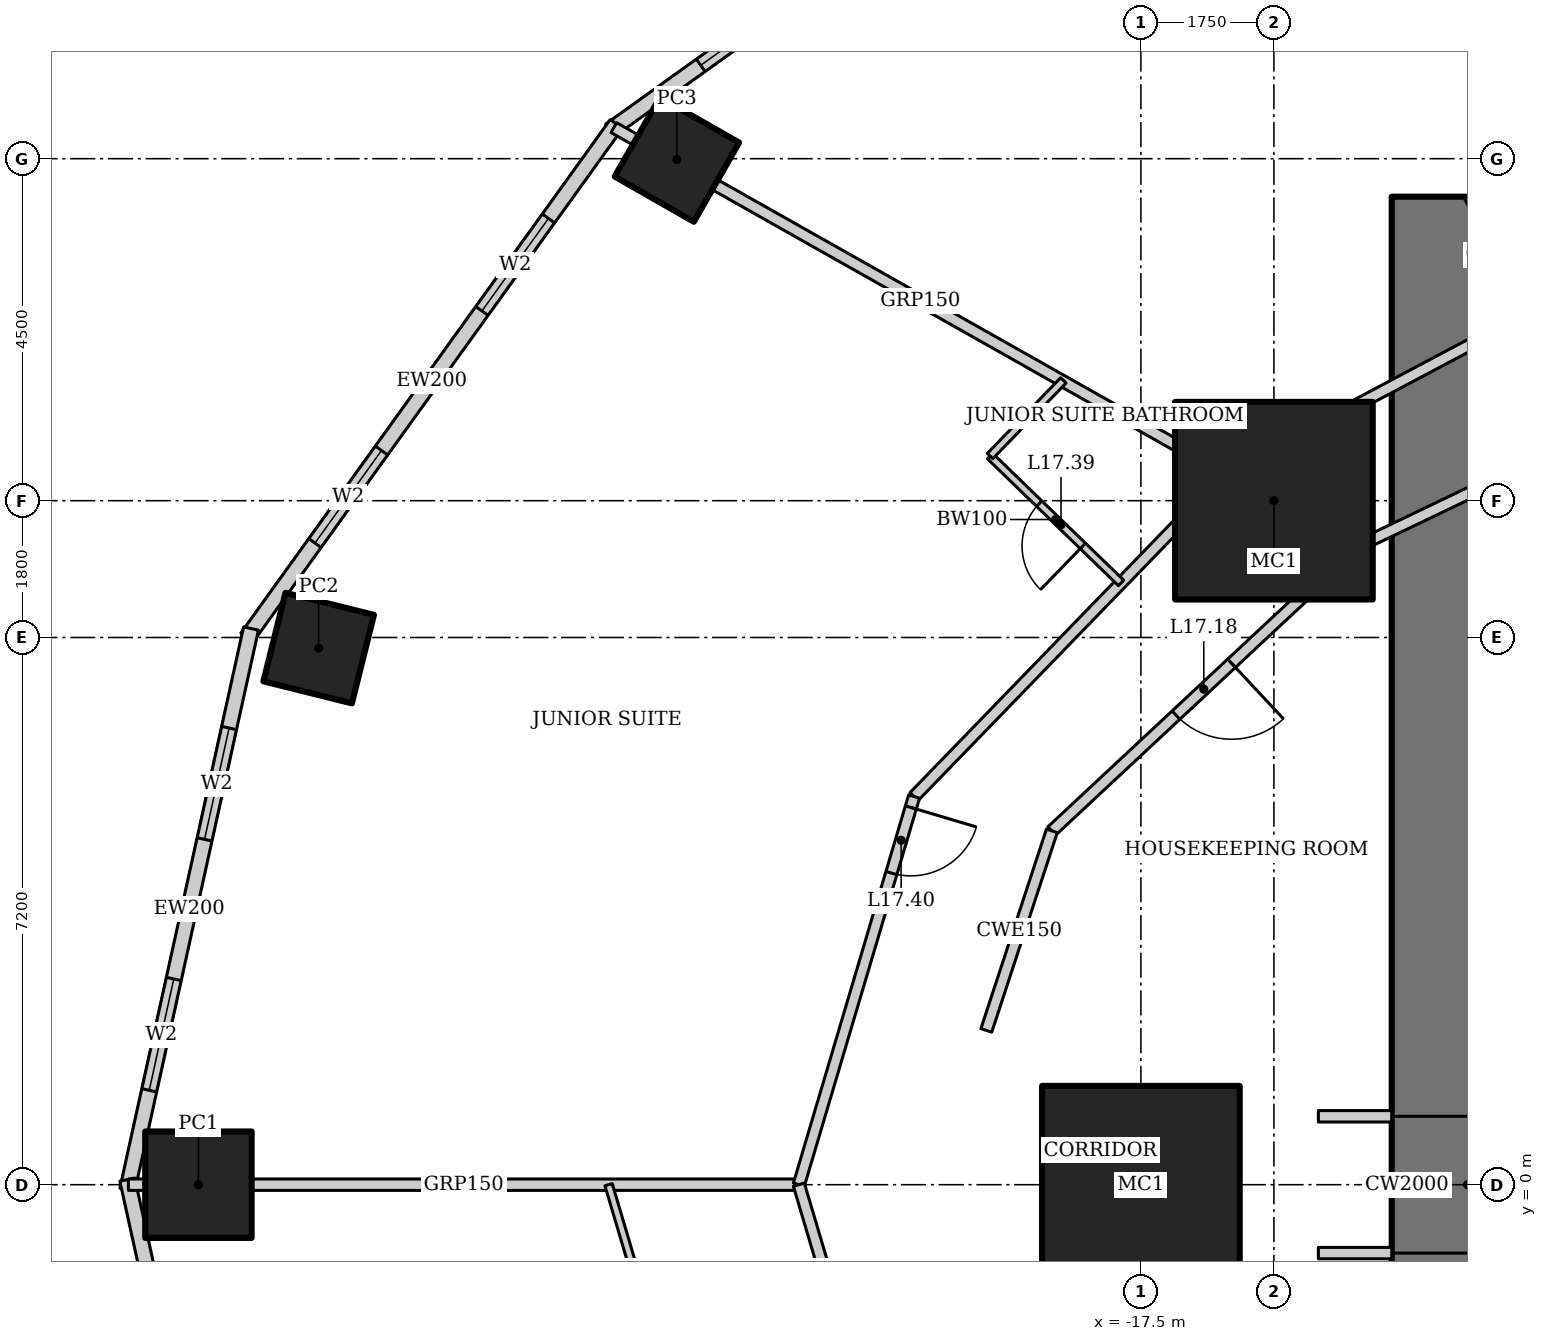
"""IFC4 building model, lengths in metres.
Left out: names, types, materials, properties, quantities, classifications, styles, units other than length and angle.
Written with IfcOpenShell. Run it as: python <this file> out.ifc"""

import sys

from ifc_helpers import new_model, si_unit, direction, frame, frame_2d, origin, origin_2d, place, context, subcontext, project, spatial, rectangle, hollow_rectangle, extrude, element, fill, save


model = new_model("IFC4")
c1 = context("Model", 3, precision=1e-05, world=origin(), true_north=direction((0.0, 1.0)))
c2 = subcontext(c1, "Body", "Model", "MODEL_VIEW")
j1 = project(units=[si_unit("LENGTHUNIT", "METRE"), si_unit("PLANEANGLEUNIT", "RADIAN")], contexts=[c1])
p1 = place(None, origin())
s1 = spatial("IfcSite", under=j1, at=p1, CompositionType="ELEMENT")
p2 = place(p1, origin())
s2 = spatial("IfcBuilding", under=s1, at=p2, CompositionType="ELEMENT")
p3 = place(p2, frame((0.0, 0.0, 76.6)))
s3 = spatial("IfcBuildingStorey", under=s2, at=p3, CompositionType="ELEMENT", Elevation=76.6)
for number, where, z_axis, x_axis in (
    (1, (-15.75, 9.0, 0.0), (0.0, 0.0, 1.0), (1.0, 0.0, 0.0)),
    (2, (-17.5, 0.0, 0.0), (0.0, 0.0, 1.0), (1.0, 0.0, 0.0)),
):
    element("IfcColumn", number, at=place(p3, frame(where, z_axis=z_axis, x_axis=x_axis)), inside=s3, PredefinedType="COLUMN", context=c2, shape_type="SweptSolid", body=[
        extrude(hollow_rectangle(XDim=2.6, YDim=2.6, WallThickness=0.13, at=origin_2d()), origin(), (0.0, 0.0, 1.0), 3.6),
    ])
p4 = place(p3, frame((-23.605, 13.489, 0.0), z_axis=(0.0, 0.0, 1.0), x_axis=(0.496139221777, 0.86824298017, 0.0)))
e3 = element("IfcColumn", 3, at=p4, inside=s3, PredefinedType="COLUMN", context=c2, shape_type="SweptSolid", body=[
    extrude(hollow_rectangle(XDim=1.2, YDim=1.2, WallThickness=0.12, at=origin_2d()), origin(), (0.0, 0.0, 1.0), 3.6),
])
p5 = place(p3, frame((-28.318, 7.06, 0.0), z_axis=(0.0, 0.0, 1.0), x_axis=(0.2419218956, 0.970295726276, 0.0)))
e4 = element("IfcColumn", 4, at=p5, inside=s3, PredefinedType="COLUMN", context=c2, shape_type="SweptSolid", body=[
    extrude(hollow_rectangle(XDim=1.2, YDim=1.2, WallThickness=0.1, at=origin_2d()), origin(), (0.0, 0.0, 1.0), 3.6),
])
p6 = place(p3, frame((-29.9, 0.0, 0.0), z_axis=(0.0, 0.0, 1.0), x_axis=(1.0, 0.0, 0.0)))
e5 = element("IfcColumn", 5, at=p6, inside=s3, PredefinedType="COLUMN", context=c2, shape_type="SweptSolid", body=[
    extrude(hollow_rectangle(XDim=1.4, YDim=1.4, WallThickness=0.1, at=origin_2d()), origin(), (0.0, 0.0, 1.0), 3.6),
])
p7 = place(p3, frame((-13.2, 13.0, 0.0), z_axis=(0.0, 0.0, 1.0), x_axis=(0.0, -1.0, 0.0)))
e6 = element("IfcWall", 6, at=p7, inside=s3, PredefinedType="SHEAR", context=c2, shape_type="SweptSolid", body=[
    extrude(rectangle(XDim=26.0, YDim=2.0, at=frame_2d((13.0, 0.0))), origin(), (0.0, 0.0, 1.0), 3.6),
])
p8 = place(p7, frame((12.1, 0.0, 0.0)))
e7 = element("IfcOpeningElement", 7, at=p8, cuts=e6, PredefinedType="OPENING", context=c2, shape_type="SweptSolid", body=[
    extrude(rectangle(XDim=1.8, YDim=2.1, at=frame_2d((0.9, 1.05))), frame((0.0, 1.01, 0.0), z_axis=(0.0, -1.0, 0.0), x_axis=(1.0, 0.0, 0.0)), (0.0, 0.0, 1.0), 2.02),
])
p9 = place(p3, frame((-17.929, 18.572, 0.0), z_axis=(0.0, 0.0, 1.0), x_axis=(-0.812791321576, -0.582554948112, 0.0)))
e8 = element("IfcWall", 8, at=p9, inside=s3, PredefinedType="SOLIDWALL", context=c2, shape_type="SweptSolid", body=[
    extrude(rectangle(XDim=8.063, YDim=0.2, at=frame_2d((4.032, 0.0))), origin(), (0.0, 0.0, 1.0), 3.45),
])
p10 = place(p9, frame((1.466, 0.0, 0.5)))
e9 = element("IfcOpeningElement", 9, at=p10, cuts=e8, PredefinedType="OPENING", context=c2, shape_type="SweptSolid", body=[
    extrude(rectangle(XDim=1.5, YDim=2.2, at=frame_2d((0.75, 1.1))), frame((0.0, 0.11, 0.0), z_axis=(0.0, -1.0, 0.0), x_axis=(1.0, 0.0, 0.0)), (0.0, 0.0, 1.0), 0.22),
])
p11 = place(p9, frame((5.097, 0.0, 0.5)))
e10 = element("IfcOpeningElement", 10, at=p11, cuts=e8, PredefinedType="OPENING", context=c2, shape_type="SweptSolid", body=[
    extrude(rectangle(XDim=1.5, YDim=2.2, at=frame_2d((0.75, 1.1))), frame((0.0, 0.11, 0.0), z_axis=(0.0, -1.0, 0.0), x_axis=(1.0, 0.0, 0.0)), (0.0, 0.0, 1.0), 0.22),
])
p12 = place(p3, frame((-24.4, 13.957, 0.0), z_axis=(0.0, 0.0, 1.0), x_axis=(-0.583937613703, -0.811798536155, 0.0)))
e11 = element("IfcWall", 11, at=p12, inside=s3, PredefinedType="SOLIDWALL", context=c2, shape_type="SweptSolid", body=[
    extrude(rectangle(XDim=8.323, YDim=0.2, at=frame_2d((4.162, 0.0))), origin(), (0.0, 0.0, 1.0), 3.45),
])
p13 = place(p12, frame((1.531, 0.0, 0.5)))
e12 = element("IfcOpeningElement", 12, at=p13, cuts=e11, PredefinedType="OPENING", context=c2, shape_type="SweptSolid", body=[
    extrude(rectangle(XDim=1.5, YDim=2.2, at=frame_2d((0.75, 1.1))), frame((0.0, 0.11, 0.0), z_axis=(0.0, -1.0, 0.0), x_axis=(1.0, 0.0, 0.0)), (0.0, 0.0, 1.0), 0.22),
])
p14 = place(p12, frame((5.292, 0.0, 0.5)))
e13 = element("IfcOpeningElement", 13, at=p14, cuts=e11, PredefinedType="OPENING", context=c2, shape_type="SweptSolid", body=[
    extrude(rectangle(XDim=1.5, YDim=2.2, at=frame_2d((0.75, 1.1))), frame((0.0, 0.11, 0.0), z_axis=(0.0, -1.0, 0.0), x_axis=(1.0, 0.0, 0.0)), (0.0, 0.0, 1.0), 0.22),
])
p15 = place(p3, frame((-29.208, 7.318, 0.0), z_axis=(0.0, 0.0, 1.0), x_axis=(-0.215238065514, -0.976561608478, 0.0)))
e14 = element("IfcWall", 14, at=p15, inside=s3, PredefinedType="SOLIDWALL", context=c2, shape_type="SweptSolid", body=[
    extrude(rectangle(XDim=7.562, YDim=0.2, at=frame_2d((3.781, 0.0))), origin(), (0.0, 0.0, 1.0), 3.45),
])
p16 = place(p15, frame((1.341, 0.0, 0.5)))
e15 = element("IfcOpeningElement", 15, at=p16, cuts=e14, PredefinedType="OPENING", context=c2, shape_type="SweptSolid", body=[
    extrude(rectangle(XDim=1.5, YDim=2.2, at=frame_2d((0.75, 1.1))), frame((0.0, 0.11, 0.0), z_axis=(0.0, -1.0, 0.0), x_axis=(1.0, 0.0, 0.0)), (0.0, 0.0, 1.0), 0.22),
])
p17 = place(p15, frame((4.722, 0.0, 0.5)))
e16 = element("IfcOpeningElement", 16, at=p17, cuts=e14, PredefinedType="OPENING", context=c2, shape_type="SweptSolid", body=[
    extrude(rectangle(XDim=1.5, YDim=2.2, at=frame_2d((0.75, 1.1))), frame((0.0, 0.11, 0.0), z_axis=(0.0, -1.0, 0.0), x_axis=(1.0, 0.0, 0.0)), (0.0, 0.0, 1.0), 0.22),
])
p18 = place(p3, frame((-30.835, 0.067, 0.0), z_axis=(0.0, 0.0, 1.0), x_axis=(0.215238065514, -0.976561608478, 0.0)))
e17 = element("IfcWall", 17, at=p18, inside=s3, PredefinedType="SOLIDWALL", context=c2, shape_type="SweptSolid", body=[
    extrude(rectangle(XDim=7.562, YDim=0.2, at=frame_2d((3.781, 0.0))), origin(), (0.0, 0.0, 1.0), 3.45),
])
p19 = place(p18, frame((1.341, 0.0, 0.5)))
e18 = element("IfcOpeningElement", 18, at=p19, cuts=e17, PredefinedType="OPENING", context=c2, shape_type="SweptSolid", body=[
    extrude(rectangle(XDim=1.5, YDim=2.2, at=frame_2d((0.75, 1.1))), frame((0.0, 0.11, 0.0), z_axis=(0.0, -1.0, 0.0), x_axis=(1.0, 0.0, 0.0)), (0.0, 0.0, 1.0), 0.22),
])
p20 = place(p18, frame((4.722, 0.0, 0.5)))
e19 = element("IfcOpeningElement", 19, at=p20, cuts=e17, PredefinedType="OPENING", context=c2, shape_type="SweptSolid", body=[
    extrude(rectangle(XDim=1.5, YDim=2.2, at=frame_2d((0.75, 1.1))), frame((0.0, 0.11, 0.0), z_axis=(0.0, -1.0, 0.0), x_axis=(1.0, 0.0, 0.0)), (0.0, 0.0, 1.0), 0.22),
])
p21 = place(p3, frame((-24.435, 13.909, 0.0), z_axis=(0.0, 0.0, 1.0), x_axis=(0.870744406136, -0.491735883563, 0.0)))
e20 = element("IfcWall", 20, at=p21, inside=s3, PredefinedType="PARTITIONING", context=c2, shape_type="SweptSolid", body=[
    extrude(rectangle(XDim=9.263, YDim=0.15, at=frame_2d((4.631, 0.0))), origin(), (0.0, 0.0, 1.0), 2.693),
])
p22 = place(p3, frame((-30.821, 0.0, 0.0), z_axis=(0.0, 0.0, 1.0), x_axis=(1.0, 0.0, 0.0)))
e21 = element("IfcWall", 21, at=p22, inside=s3, PredefinedType="PARTITIONING", context=c2, shape_type="SweptSolid", body=[
    extrude(rectangle(XDim=8.821, YDim=0.15, at=frame_2d((4.41, 0.0))), origin(), (0.0, 0.0, 1.0), 2.528),
])
p23 = place(p3, frame((-11.519, 11.928, 0.0), z_axis=(0.0, 0.0, 1.0), x_axis=(-0.883334368785, -0.468743419071, 0.0)))
e22 = element("IfcWall", 22, at=p23, inside=s3, PredefinedType="PARTITIONING", context=c2, shape_type="SweptSolid", body=[
    extrude(rectangle(XDim=5.491, YDim=0.15, at=frame_2d((2.746, 0.0))), origin(), (0.0, 0.0, 1.0), 3.45),
])
p24 = place(p3, frame((-16.369, 9.354, 0.0), z_axis=(0.0, 0.0, 1.0), x_axis=(-0.695871090686, -0.71816671125, 0.0)))
e23 = element("IfcWall", 23, at=p24, inside=s3, PredefinedType="PARTITIONING", context=c2, shape_type="SweptSolid", body=[
    extrude(rectangle(XDim=5.913, YDim=0.15, at=frame_2d((2.957, 0.0))), origin(), (0.0, 0.0, 1.0), 3.45),
])
p25 = place(p3, frame((-20.484, 5.107, 0.0), z_axis=(0.0, 0.0, 1.0), x_axis=(-0.284584469409, -0.95865096869, 0.0)))
e24 = element("IfcWall", 24, at=p25, inside=s3, PredefinedType="PARTITIONING", context=c2, shape_type="SweptSolid", body=[
    extrude(rectangle(XDim=5.327, YDim=0.15, at=frame_2d((2.664, 0.0))), origin(), (0.0, 0.0, 1.0), 3.45),
])
p26 = place(p25, frame((0.15, 0.0, 0.0)))
e25 = element("IfcOpeningElement", 25, at=p26, cuts=e24, PredefinedType="OPENING", context=c2, shape_type="SweptSolid", body=[
    extrude(rectangle(XDim=0.9, YDim=2.1, at=frame_2d((0.45, 1.05))), frame((0.0, 0.085, 0.0), z_axis=(0.0, -1.0, 0.0), x_axis=(1.0, 0.0, 0.0)), (0.0, 0.0, 1.0), 0.17),
])
p27 = place(p3, frame((-22.0, 0.0, 0.0), z_axis=(0.0, 0.0, 1.0), x_axis=(0.284584469409, -0.95865096869, 0.0)))
e26 = element("IfcWall", 26, at=p27, inside=s3, PredefinedType="PARTITIONING", context=c2, shape_type="SweptSolid", body=[
    extrude(rectangle(XDim=5.327, YDim=0.15, at=frame_2d((2.664, 0.0))), origin(), (0.0, 0.0, 1.0), 3.45),
])
p28 = place(p3, frame((-10.177, 10.539, 0.0), z_axis=(0.0, 0.0, 1.0), x_axis=(-0.901869692799, -0.43200816799, 0.0)))
e27 = element("IfcWall", 27, at=p28, inside=s3, PredefinedType="PARTITIONING", context=c2, shape_type="SweptSolid", body=[
    extrude(rectangle(XDim=4.986, YDim=0.15, at=frame_2d((2.493, 0.0))), origin(), (0.0, 0.0, 1.0), 3.45),
])
p29 = place(p3, frame((-14.673, 8.385, 0.0), z_axis=(0.0, 0.0, 1.0), x_axis=(-0.731260145007, -0.682098673452, 0.0)))
e28 = element("IfcWall", 28, at=p29, inside=s3, PredefinedType="PARTITIONING", context=c2, shape_type="SweptSolid", body=[
    extrude(rectangle(XDim=5.468, YDim=0.15, at=frame_2d((2.734, 0.0))), origin(), (0.0, 0.0, 1.0), 3.45),
])
p30 = place(p29, frame((2.234, 0.0, 0.0)))
e29 = element("IfcOpeningElement", 29, at=p30, cuts=e28, PredefinedType="OPENING", context=c2, shape_type="SweptSolid", body=[
    extrude(rectangle(XDim=1.0, YDim=2.1, at=frame_2d((0.5, 1.05))), frame((0.0, 0.085, 0.0), z_axis=(0.0, -1.0, 0.0), x_axis=(1.0, 0.0, 0.0)), (0.0, 0.0, 1.0), 0.17),
])
p31 = place(p3, frame((-17.761, 7.917, 0.0), z_axis=(0.0, 0.0, 1.0), x_axis=(-0.718157610206, 0.695880483204, 0.0)))
e30 = element("IfcWall", 30, at=p31, inside=s3, PredefinedType="PARTITIONING", context=c2, shape_type="SweptSolid", body=[
    extrude(rectangle(XDim=2.4, YDim=0.1, at=frame_2d((1.2, 0.0))), origin(), (0.0, 0.0, 1.0), 3.45),
])
p32 = place(p31, frame((0.7, 0.0, 0.0)))
e31 = element("IfcOpeningElement", 31, at=p32, cuts=e30, PredefinedType="OPENING", context=c2, shape_type="SweptSolid", body=[
    extrude(rectangle(XDim=0.8, YDim=2.1, at=frame_2d((0.4, 1.05))), frame((0.0, 0.06, 0.0), z_axis=(0.0, -1.0, 0.0), x_axis=(1.0, 0.0, 0.0)), (0.0, 0.0, 1.0), 0.12),
])
p33 = place(p3, frame((-19.484, 9.588, 0.0), z_axis=(0.0, 0.0, 1.0), x_axis=(0.695920174922, 0.718119147591, 0.0)))
e32 = element("IfcWall", 32, at=p33, inside=s3, PredefinedType="PARTITIONING", context=c2, shape_type="SweptSolid", body=[
    extrude(rectangle(XDim=1.386, YDim=0.1, at=frame_2d((0.693, 0.0))), origin(), (0.0, 0.0, 1.0), 3.45),
])
p34 = place(p3, frame((-23.732, -2.6, 0.0), z_axis=(0.0, 0.0, 1.0), x_axis=(-0.284514277473, 0.958671803025, 0.0)))
e33 = element("IfcWall", 33, at=p34, inside=s3, PredefinedType="PARTITIONING", context=c2, shape_type="SweptSolid", body=[
    extrude(rectangle(XDim=2.712, YDim=0.1, at=frame_2d((1.356, 0.0))), origin(), (0.0, 0.0, 1.0), 3.45),
])
p35 = place(p3, frame((-13.2, 13.0, 0.0), z_axis=(0.0, 0.0, 1.0), x_axis=(0.46874717052, -0.88333237806, 0.0)))
e34 = element("IfcWall", 34, at=p35, inside=s3, PredefinedType="PARTITIONING", context=c2, shape_type="SweptSolid", body=[
    extrude(rectangle(XDim=1.735, YDim=0.1, at=frame_2d((0.868, 0.0))), origin(), (0.0, 0.0, 1.0), 3.45),
])
p36 = place(p3, frame((-18.672, 4.655, 0.0), z_axis=(0.0, 0.0, 1.0), x_axis=(-0.311929965981, -0.950105097515, 0.0)))
e35 = element("IfcWall", 35, at=p36, inside=s3, PredefinedType="PARTITIONING", context=c2, shape_type="SweptSolid", body=[
    extrude(rectangle(XDim=2.763, YDim=0.15, at=frame_2d((1.381, 0.0))), origin(), (0.0, 0.0, 1.0), 3.45),
])
for number, where, z_axis, x_axis in (
    (36, (-14.2, -0.9, 0.0), (0.0, 0.0, 1.0), (-1.0, 0.0, 0.0)),
    (37, (-14.2, 0.9, 0.0), (0.0, 0.0, 1.0), (-1.0, 0.0, 0.0)),
):
    element("IfcWall", number, at=place(p3, frame(where, z_axis=z_axis, x_axis=x_axis)), inside=s3, PredefinedType="PARTITIONING", context=c2, shape_type="SweptSolid", body=[
        extrude(rectangle(XDim=0.965, YDim=0.15, at=frame_2d((0.482, 0.0))), origin(), (0.0, 0.0, 1.0), 3.45),
    ])
p37 = place(p11, origin())
e38 = element("IfcWindow", 38, at=p37, inside=s3, PartitioningType="SINGLE_PANEL", PredefinedType="WINDOW", context=c2, shape_type="SweptSolid", body=[
    extrude(rectangle(XDim=1.5, YDim=2.2, at=frame_2d((0.75, 1.1))), frame((0.0, 0.03, 0.0), z_axis=(0.0, -1.0, 0.0), x_axis=(1.0, 0.0, 0.0)), (0.0, 0.0, 1.0), 0.06),
])
fill(e10, e38)
p38 = place(p13, origin())
e39 = element("IfcWindow", 39, at=p38, inside=s3, PartitioningType="SINGLE_PANEL", PredefinedType="WINDOW", context=c2, shape_type="SweptSolid", body=[
    extrude(rectangle(XDim=1.5, YDim=2.2, at=frame_2d((0.75, 1.1))), frame((0.0, 0.03, 0.0), z_axis=(0.0, -1.0, 0.0), x_axis=(1.0, 0.0, 0.0)), (0.0, 0.0, 1.0), 0.06),
])
fill(e12, e39)
p39 = place(p14, origin())
e40 = element("IfcWindow", 40, at=p39, inside=s3, PartitioningType="SINGLE_PANEL", PredefinedType="WINDOW", context=c2, shape_type="SweptSolid", body=[
    extrude(rectangle(XDim=1.5, YDim=2.2, at=frame_2d((0.75, 1.1))), frame((0.0, 0.03, 0.0), z_axis=(0.0, -1.0, 0.0), x_axis=(1.0, 0.0, 0.0)), (0.0, 0.0, 1.0), 0.06),
])
fill(e13, e40)
p40 = place(p16, origin())
e41 = element("IfcWindow", 41, at=p40, inside=s3, PartitioningType="SINGLE_PANEL", PredefinedType="WINDOW", context=c2, shape_type="SweptSolid", body=[
    extrude(rectangle(XDim=1.5, YDim=2.2, at=frame_2d((0.75, 1.1))), frame((0.0, 0.03, 0.0), z_axis=(0.0, -1.0, 0.0), x_axis=(1.0, 0.0, 0.0)), (0.0, 0.0, 1.0), 0.06),
])
fill(e15, e41)
p41 = place(p17, origin())
e42 = element("IfcWindow", 42, at=p41, inside=s3, PartitioningType="SINGLE_PANEL", PredefinedType="WINDOW", context=c2, shape_type="SweptSolid", body=[
    extrude(rectangle(XDim=1.5, YDim=2.2, at=frame_2d((0.75, 1.1))), frame((0.0, 0.03, 0.0), z_axis=(0.0, -1.0, 0.0), x_axis=(1.0, 0.0, 0.0)), (0.0, 0.0, 1.0), 0.06),
])
fill(e16, e42)
p42 = place(p8, origin())
e43 = element("IfcDoor", 43, at=p42, inside=s3, OperationType="DOUBLE_DOOR_DOUBLE_SWING", PredefinedType="DOOR", context=c2, shape_type="SweptSolid", body=[
    extrude(rectangle(XDim=1.8, YDim=2.1, at=frame_2d((0.9, 1.05))), frame((0.0, 0.025, 0.0), z_axis=(0.0, -1.0, 0.0), x_axis=(1.0, 0.0, 0.0)), (0.0, 0.0, 1.0), 0.05),
])
fill(e7, e43)
p43 = place(p30, origin())
e44 = element("IfcDoor", 44, at=p43, inside=s3, OperationType="SINGLE_SWING_LEFT", PredefinedType="DOOR", context=c2, shape_type="SweptSolid", body=[
    extrude(rectangle(XDim=1.0, YDim=2.1, at=frame_2d((0.5, 1.05))), frame((0.0, 0.025, 0.0), z_axis=(0.0, -1.0, 0.0), x_axis=(1.0, 0.0, 0.0)), (0.0, 0.0, 1.0), 0.05),
])
fill(e29, e44)
p44 = place(p32, origin())
e45 = element("IfcDoor", 45, at=p44, inside=s3, OperationType="SINGLE_SWING_LEFT", PredefinedType="DOOR", context=c2, shape_type="SweptSolid", body=[
    extrude(rectangle(XDim=0.8, YDim=2.1, at=frame_2d((0.4, 1.05))), frame((0.0, 0.025, 0.0), z_axis=(0.0, -1.0, 0.0), x_axis=(1.0, 0.0, 0.0)), (0.0, 0.0, 1.0), 0.05),
])
fill(e31, e45)
p45 = place(p26, origin())
e46 = element("IfcDoor", 46, at=p45, inside=s3, OperationType="SINGLE_SWING_LEFT", PredefinedType="DOOR", context=c2, shape_type="SweptSolid", body=[
    extrude(rectangle(XDim=0.9, YDim=2.1, at=frame_2d((0.45, 1.05))), frame((0.0, 0.025, 0.0), z_axis=(0.0, -1.0, 0.0), x_axis=(1.0, 0.0, 0.0)), (0.0, 0.0, 1.0), 0.05),
])
fill(e25, e46)
save(model, sys.argv[1])
